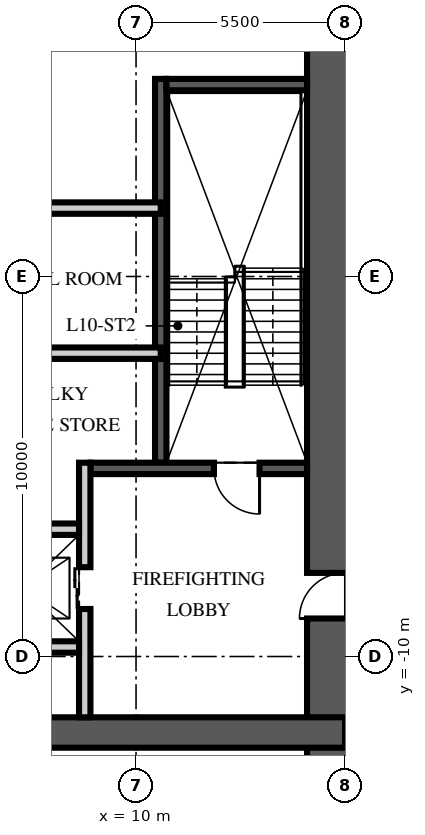
"""IFC4 building model, lengths in metres.
Left out: names, types, materials, properties, quantities, classifications, styles, units other than length and angle.
Written with IfcOpenShell. Run it as: python <this file> out.ifc"""

import sys

from ifc_helpers import new_model, si_unit, direction, frame, frame_2d, origin, place, context, subcontext, project, spatial, rectangle, extrude, element, fill, save


model = new_model("IFC4")
c1 = context("Model", 3, precision=1e-05, world=origin(), true_north=direction((0.0, 1.0)))
c2 = subcontext(c1, "Body", "Model", "MODEL_VIEW")
j1 = project(units=[si_unit("LENGTHUNIT", "METRE"), si_unit("PLANEANGLEUNIT", "RADIAN")], contexts=[c1])
p1 = place(None, origin())
s1 = spatial("IfcSite", under=j1, at=p1, CompositionType="ELEMENT")
p2 = place(p1, origin())
s2 = spatial("IfcBuilding", under=s1, at=p2, CompositionType="ELEMENT")
p3 = place(p2, frame((0.0, 0.0, 43.5)))
s3 = spatial("IfcBuildingStorey", under=s2, at=p3, CompositionType="ELEMENT", Elevation=43.5)
p4 = place(p3, frame((15.5, -15.5, -0.25), z_axis=(0.0, 0.0, 1.0), x_axis=(0.0, 1.0, 0.0)))
e1 = element("IfcWall", 1, at=p4, inside=s3, PredefinedType="SHEAR", context=c2, shape_type="SweptSolid", body=[
    extrude(rectangle(XDim=31.0, YDim=2.0, at=frame_2d((15.5, 0.0))), origin(), (0.0, 0.0, 1.0), 3.75),
])
p5 = place(p4, frame((6.5, 0.0, 0.25)))
e2 = element("IfcOpeningElement", 2, at=p5, cuts=e1, PredefinedType="OPENING", context=c2, shape_type="SweptSolid", body=[
    extrude(rectangle(XDim=1.2, YDim=2.1, at=frame_2d((0.6, 1.05))), frame((0.0, 1.01, 0.0), z_axis=(0.0, -1.0, 0.0), x_axis=(1.0, 0.0, 0.0)), (0.0, 0.0, 1.0), 2.02),
])
p6 = place(p4, frame((23.0, 0.0, 0.25)))
e3 = element("IfcOpeningElement", 3, at=p6, cuts=e1, PredefinedType="OPENING", context=c2, shape_type="SweptSolid", body=[
    extrude(rectangle(XDim=1.8, YDim=2.1, at=frame_2d((0.9, 1.05))), frame((0.0, 1.01, 0.0), z_axis=(0.0, -1.0, 0.0), x_axis=(1.0, 0.0, 0.0)), (0.0, 0.0, 1.0), 2.02),
])
p7 = place(p3, frame((-15.5, -12.0, -0.25), z_axis=(0.0, 0.0, 1.0), x_axis=(1.0, 0.0, 0.0)))
e4 = element("IfcWall", 4, at=p7, inside=s3, PredefinedType="SHEAR", context=c2, shape_type="SweptSolid", body=[
    extrude(rectangle(XDim=31.0, YDim=0.8, at=frame_2d((15.5, 0.0))), origin(), (0.0, 0.0, 1.0), 3.75),
])
p8 = place(p3, frame((10.65, -4.9, 0.0), z_axis=(0.0, 0.0, 1.0), x_axis=(0.0, 1.0, 0.0)))
e5 = element("IfcWall", 5, at=p8, inside=s3, PredefinedType="SOLIDWALL", context=c2, shape_type="SweptSolid", body=[
    extrude(rectangle(XDim=10.1, YDim=0.3, at=frame_2d((5.05, 0.0))), origin(), (0.0, 0.0, 1.0), 3.5),
])
p9 = place(p3, frame((14.5, -5.05, 0.0), z_axis=(0.0, 0.0, 1.0), x_axis=(-1.0, 0.0, 0.0)))
e6 = element("IfcWall", 6, at=p9, inside=s3, PredefinedType="SOLIDWALL", context=c2, shape_type="SweptSolid", body=[
    extrude(rectangle(XDim=5.7, YDim=0.3, at=frame_2d((2.85, 0.0))), origin(), (0.0, 0.0, 1.0), 3.5),
])
p10 = place(p9, frame((1.25, 0.0, 0.0)))
e7 = element("IfcOpeningElement", 7, at=p10, cuts=e6, PredefinedType="OPENING", context=c2, shape_type="SweptSolid", body=[
    extrude(rectangle(XDim=1.2, YDim=2.1, at=frame_2d((0.6, 1.05))), frame((0.0, 0.16, 0.0), z_axis=(0.0, -1.0, 0.0), x_axis=(1.0, 0.0, 0.0)), (0.0, 0.0, 1.0), 0.32),
])
p11 = place(p3, frame((14.5, 5.05, 0.0), z_axis=(0.0, 0.0, 1.0), x_axis=(-1.0, 0.0, 0.0)))
e8 = element("IfcWall", 8, at=p11, inside=s3, PredefinedType="SOLIDWALL", context=c2, shape_type="SweptSolid", body=[
    extrude(rectangle(XDim=3.7, YDim=0.3, at=frame_2d((1.85, 0.0))), origin(), (0.0, 0.0, 1.0), 3.5),
])
p12 = place(p3, frame((8.65, -11.6, 0.0), z_axis=(0.0, 0.0, 1.0), x_axis=(0.0, 1.0, 0.0)))
e9 = element("IfcWall", 9, at=p12, inside=s3, PredefinedType="PARTITIONING", context=c2, shape_type="SweptSolid", body=[
    extrude(rectangle(XDim=6.7, YDim=0.3, at=frame_2d((3.35, 0.0))), origin(), (0.0, 0.0, 1.0), 3.5),
])
p13 = place(p12, frame((2.85, 0.0, 0.0)))
e10 = element("IfcOpeningElement", 10, at=p13, cuts=e9, PredefinedType="OPENING", context=c2, shape_type="SweptSolid", body=[
    extrude(rectangle(XDim=1.1, YDim=2.1, at=frame_2d((0.55, 1.05))), frame((0.0, 0.16, 0.0), z_axis=(0.0, -1.0, 0.0), x_axis=(1.0, 0.0, 0.0)), (0.0, 0.0, 1.0), 0.32),
])
p14 = place(p3, frame((-8.5, -6.65, 0.0), z_axis=(0.0, 0.0, 1.0), x_axis=(1.0, 0.0, 0.0)))
e11 = element("IfcWall", 11, at=p14, inside=s3, PredefinedType="PARTITIONING", context=c2, shape_type="SweptSolid", body=[
    extrude(rectangle(XDim=17.0, YDim=0.3, at=frame_2d((8.5, 0.0))), origin(), (0.0, 0.0, 1.0), 3.5),
])
p15 = place(p14, frame((7.8, 0.0, 0.0)))
e12 = element("IfcOpeningElement", 12, at=p15, cuts=e11, PredefinedType="OPENING", context=c2, shape_type="SweptSolid", body=[
    extrude(rectangle(XDim=1.3, YDim=2.4, at=frame_2d((0.65, 1.2))), frame((0.0, 0.16, 0.0), z_axis=(0.0, -1.0, 0.0), x_axis=(1.0, 0.0, 0.0)), (0.0, 0.0, 1.0), 0.32),
])
p16 = place(p14, frame((5.65, 0.0, 0.0)))
e13 = element("IfcOpeningElement", 13, at=p16, cuts=e11, PredefinedType="OPENING", context=c2, shape_type="SweptSolid", body=[
    extrude(rectangle(XDim=0.9, YDim=2.1, at=frame_2d((0.45, 1.05))), frame((0.0, 0.16, 0.0), z_axis=(0.0, -1.0, 0.0), x_axis=(1.0, 0.0, 0.0)), (0.0, 0.0, 1.0), 0.32),
])
p17 = place(p14, frame((10.4, 0.0, 0.0)))
e14 = element("IfcOpeningElement", 14, at=p17, cuts=e11, PredefinedType="OPENING", context=c2, shape_type="SweptSolid", body=[
    extrude(rectangle(XDim=0.9, YDim=2.1, at=frame_2d((0.45, 1.05))), frame((0.0, 0.16, 0.0), z_axis=(0.0, -1.0, 0.0), x_axis=(1.0, 0.0, 0.0)), (0.0, 0.0, 1.0), 0.32),
])
p18 = place(p3, frame((5.6, -9.75, 0.0), z_axis=(0.0, 0.0, 1.0), x_axis=(1.0, 0.0, 0.0)))
e15 = element("IfcWall", 15, at=p18, inside=s3, PredefinedType="PARTITIONING", context=c2, shape_type="SweptSolid", body=[
    extrude(rectangle(XDim=2.9, YDim=0.3, at=frame_2d((1.45, 0.0))), origin(), (0.0, 0.0, 1.0), 3.5),
])
p19 = place(p3, frame((-10.65, 1.8, 0.0), z_axis=(0.0, 0.0, 1.0), x_axis=(1.0, 0.0, 0.0)))
e16 = element("IfcWall", 16, at=p19, inside=s3, PredefinedType="PARTITIONING", context=c2, shape_type="SweptSolid", body=[
    extrude(rectangle(XDim=21.3, YDim=0.3, at=frame_2d((10.65, 0.0))), origin(), (0.0, 0.0, 1.0), 3.5),
])
p20 = place(p19, frame((10.05, 0.0, 0.0)))
e17 = element("IfcOpeningElement", 17, at=p20, cuts=e16, PredefinedType="OPENING", context=c2, shape_type="SweptSolid", body=[
    extrude(rectangle(XDim=1.2, YDim=2.1, at=frame_2d((0.6, 1.05))), frame((0.0, 0.16, 0.0), z_axis=(0.0, -1.0, 0.0), x_axis=(1.0, 0.0, 0.0)), (0.0, 0.0, 1.0), 0.32),
])
p21 = place(p19, frame((0.938, 0.0, 0.0)))
e18 = element("IfcOpeningElement", 18, at=p21, cuts=e16, PredefinedType="OPENING", context=c2, shape_type="SweptSolid", body=[
    extrude(rectangle(XDim=0.9, YDim=2.1, at=frame_2d((0.45, 1.05))), frame((0.0, 0.16, 0.0), z_axis=(0.0, -1.0, 0.0), x_axis=(1.0, 0.0, 0.0)), (0.0, 0.0, 1.0), 0.32),
])
p22 = place(p3, frame((10.65, -2.018, 0.0), z_axis=(0.0, 0.0, 1.0), x_axis=(-1.0, 0.0, 0.0)))
e19 = element("IfcWall", 19, at=p22, inside=s3, PredefinedType="PARTITIONING", context=c2, shape_type="SweptSolid", body=[
    extrude(rectangle(XDim=5.55, YDim=0.3, at=frame_2d((2.775, 0.0))), origin(), (0.0, 0.0, 1.0), 3.5),
])
p23 = place(p10, origin())
e20 = element("IfcDoor", 20, at=p23, inside=s3, OperationType="SINGLE_SWING_LEFT", PredefinedType="DOOR", context=c2, shape_type="SweptSolid", body=[
    extrude(rectangle(XDim=1.2, YDim=2.1, at=frame_2d((0.6, 1.05))), frame((0.0, 0.025, 0.0), z_axis=(0.0, -1.0, 0.0), x_axis=(1.0, 0.0, 0.0)), (0.0, 0.0, 1.0), 0.05),
])
fill(e7, e20)
p24 = place(p5, origin())
e21 = element("IfcDoor", 21, at=p24, inside=s3, OperationType="SINGLE_SWING_LEFT", PredefinedType="DOOR", context=c2, shape_type="SweptSolid", body=[
    extrude(rectangle(XDim=1.2, YDim=2.1, at=frame_2d((0.6, 1.05))), frame((0.0, 0.025, 0.0), z_axis=(0.0, -1.0, 0.0), x_axis=(1.0, 0.0, 0.0)), (0.0, 0.0, 1.0), 0.05),
])
fill(e2, e21)
p25 = place(p13, origin())
e22 = element("IfcDoor", 22, at=p25, inside=s3, OperationType="DOUBLE_DOOR_SLIDING", PredefinedType="DOOR", context=c2, shape_type="SweptSolid", body=[
    extrude(rectangle(XDim=1.1, YDim=2.1, at=frame_2d((0.55, 1.05))), frame((0.0, 0.025, 0.0), z_axis=(0.0, -1.0, 0.0), x_axis=(1.0, 0.0, 0.0)), (0.0, 0.0, 1.0), 0.05),
])
fill(e10, e22)
save(model, sys.argv[1])
